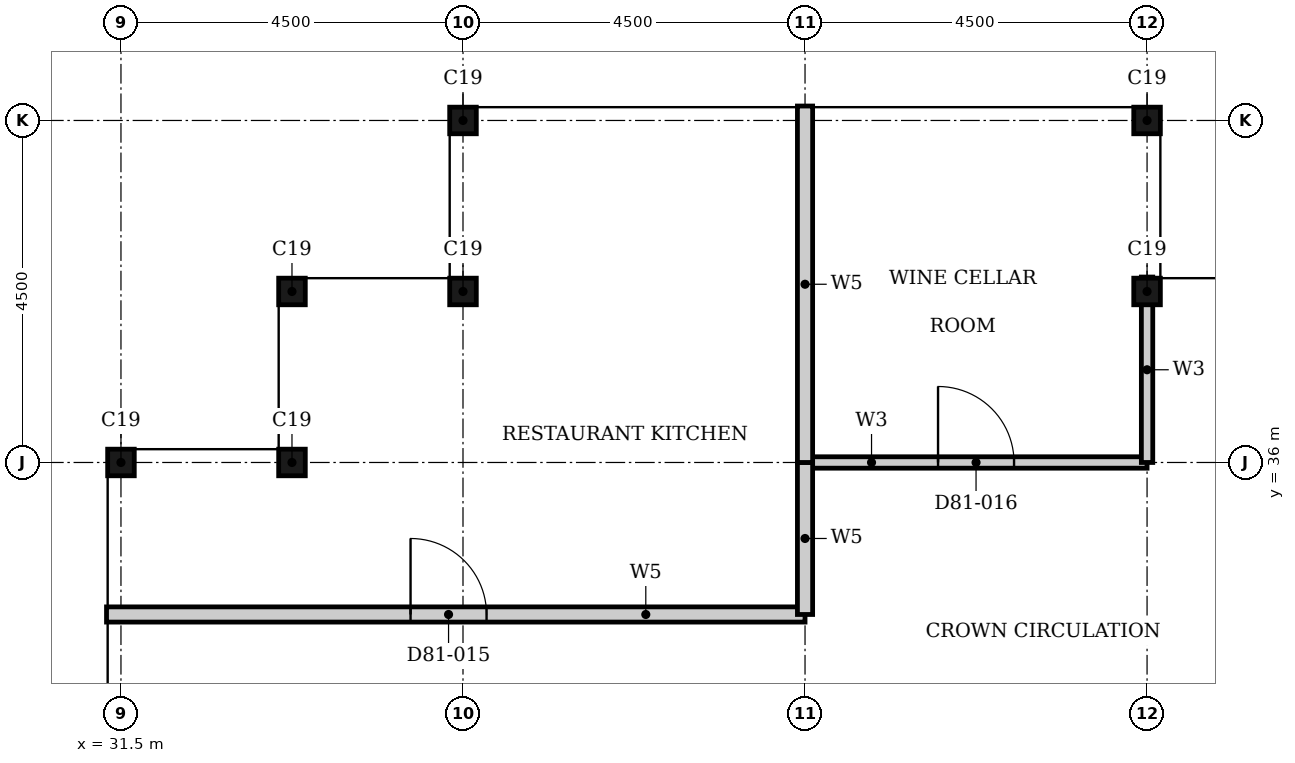
"""IFC4 building model, lengths in metres.
Left out: names, types, materials, properties, quantities, classifications, styles, units other than length and angle.
Written with IfcOpenShell. Run it as: python <this file> out.ifc"""

import sys

from ifc_helpers import new_model, si_unit, direction, frame, frame_2d, origin, origin_2d, place, context, subcontext, project, spatial, rectangle, i_section, extrude, element, fill, save


model = new_model("IFC4")
c1 = context("Model", 3, precision=1e-05, world=origin(), true_north=direction((0.0, 1.0)))
c2 = subcontext(c1, "Body", "Model", "MODEL_VIEW")
j1 = project(units=[si_unit("LENGTHUNIT", "METRE"), si_unit("PLANEANGLEUNIT", "RADIAN")], contexts=[c1])
p1 = place(None, origin())
s1 = spatial("IfcSite", under=j1, at=p1, CompositionType="ELEMENT")
p2 = place(p1, origin())
s2 = spatial("IfcBuilding", under=s1, at=p2, CompositionType="ELEMENT")
p3 = place(p2, frame((0.0, 0.0, 321.2)))
s3 = spatial("IfcBuildingStorey", under=s2, at=p3, CompositionType="ELEMENT", Elevation=321.2)
for number, where, z_axis, x_axis in (
    (1, (45.0, 38.25, 0.0), (0.0, 0.0, 1.0), (1.0, 0.0, 0.0)),
    (2, (45.0, 40.5, 0.0), (0.0, 0.0, 1.0), (1.0, 0.0, 0.0)),
    (3, (36.0, 40.5, 0.0), (0.0, 0.0, 1.0), (1.0, 0.0, 0.0)),
    (4, (36.0, 38.25, 0.0), (0.0, 0.0, 1.0), (1.0, 0.0, 0.0)),
    (5, (33.75, 38.25, 0.0), (0.0, 0.0, 1.0), (1.0, 0.0, 0.0)),
    (6, (33.75, 36.0, 0.0), (0.0, 0.0, 1.0), (1.0, 0.0, 0.0)),
    (7, (31.5, 36.0, 0.0), (0.0, 0.0, 1.0), (1.0, 0.0, 0.0)),
):
    element("IfcColumn", number, at=place(p3, frame(where, z_axis=z_axis, x_axis=x_axis)), inside=s3, PredefinedType="COLUMN", context=c2, shape_type="SweptSolid", body=[
        extrude(i_section(OverallWidth=0.35, OverallDepth=0.35, WebThickness=0.012, FlangeThickness=0.019, FilletRadius=0.013, at=origin_2d()), origin(), (0.0, 0.0, 1.0), 4.2),
    ])
p4 = place(p3, frame((40.5, 36.0, 0.0), z_axis=(0.0, 0.0, 1.0), x_axis=(1.0, 0.0, 0.0)))
e8 = element("IfcWall", 8, at=p4, inside=s3, PredefinedType="PARTITIONING", context=c2, shape_type="SweptSolid", body=[
    extrude(rectangle(XDim=4.5, YDim=0.15, at=frame_2d((2.25, 0.0))), origin(), (0.0, 0.0, 1.0), 3.08),
])
p5 = place(p4, frame((1.75, 0.0, 0.0)))
e9 = element("IfcOpeningElement", 9, at=p5, cuts=e8, PredefinedType="OPENING", context=c2, shape_type="SweptSolid", body=[
    extrude(rectangle(XDim=1.0, YDim=2.1, at=frame_2d((0.5, 1.05))), frame((0.0, 0.085, 0.0), z_axis=(0.0, -1.0, 0.0), x_axis=(1.0, 0.0, 0.0)), (0.0, 0.0, 1.0), 0.17),
])
p6 = place(p3, frame((45.0, 36.0, 0.0), z_axis=(0.0, 0.0, 1.0), x_axis=(0.0, 1.0, 0.0)))
e10 = element("IfcWall", 10, at=p6, inside=s3, PredefinedType="PARTITIONING", context=c2, shape_type="SweptSolid", body=[
    extrude(rectangle(XDim=2.44, YDim=0.15, at=frame_2d((1.22, 0.0))), origin(), (0.0, 0.0, 1.0), 3.9),
])
p7 = place(p3, frame((31.31, 34.0, 0.0), z_axis=(0.0, 0.0, 1.0), x_axis=(1.0, 0.0, 0.0)))
e11 = element("IfcWall", 11, at=p7, inside=s3, PredefinedType="PARTITIONING", context=c2, shape_type="SweptSolid", body=[
    extrude(rectangle(XDim=9.19, YDim=0.2, at=frame_2d((4.595, 0.0))), origin(), (0.0, 0.0, 1.0), 3.9),
])
p8 = place(p7, frame((4.0, 0.0, 0.0)))
e12 = element("IfcOpeningElement", 12, at=p8, cuts=e11, PredefinedType="OPENING", context=c2, shape_type="SweptSolid", body=[
    extrude(rectangle(XDim=1.0, YDim=2.1, at=frame_2d((0.5, 1.05))), frame((0.0, 0.11, 0.0), z_axis=(0.0, -1.0, 0.0), x_axis=(1.0, 0.0, 0.0)), (0.0, 0.0, 1.0), 0.22),
])
p9 = place(p3, frame((40.5, 34.0, 0.0), z_axis=(0.0, 0.0, 1.0), x_axis=(0.0, 1.0, 0.0)))
e13 = element("IfcWall", 13, at=p9, inside=s3, PredefinedType="PARTITIONING", context=c2, shape_type="SweptSolid", body=[
    extrude(rectangle(XDim=2.0, YDim=0.2, at=frame_2d((1.0, 0.0))), origin(), (0.0, 0.0, 1.0), 3.9),
])
p10 = place(p3, frame((40.5, 36.0, 0.0), z_axis=(0.0, 0.0, 1.0), x_axis=(0.0, 1.0, 0.0)))
e14 = element("IfcWall", 14, at=p10, inside=s3, PredefinedType="PARTITIONING", context=c2, shape_type="SweptSolid", body=[
    extrude(rectangle(XDim=4.69, YDim=0.2, at=frame_2d((2.345, 0.0))), origin(), (0.0, 0.0, 1.0), 3.9),
])
p11 = place(p8, origin())
e15 = element("IfcDoor", 15, at=p11, inside=s3, OperationType="SINGLE_SWING_LEFT", PredefinedType="DOOR", context=c2, shape_type="SweptSolid", body=[
    extrude(rectangle(XDim=1.0, YDim=2.1, at=frame_2d((0.5, 1.05))), frame((0.0, 0.025, 0.0), z_axis=(0.0, -1.0, 0.0), x_axis=(1.0, 0.0, 0.0)), (0.0, 0.0, 1.0), 0.05),
])
fill(e12, e15)
p12 = place(p5, origin())
e16 = element("IfcDoor", 16, at=p12, inside=s3, OperationType="SINGLE_SWING_LEFT", PredefinedType="DOOR", context=c2, shape_type="SweptSolid", body=[
    extrude(rectangle(XDim=1.0, YDim=2.1, at=frame_2d((0.5, 1.05))), frame((0.0, 0.025, 0.0), z_axis=(0.0, -1.0, 0.0), x_axis=(1.0, 0.0, 0.0)), (0.0, 0.0, 1.0), 0.05),
])
fill(e9, e16)
save(model, sys.argv[1])
